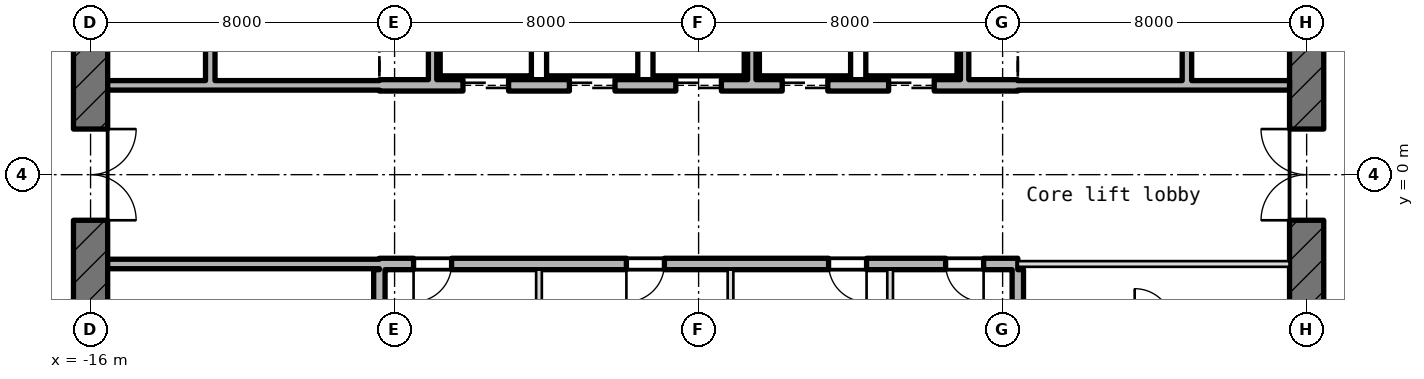
"""IFC4 building model, lengths in metres.
Left out: names, types, materials, properties, quantities, classifications, styles, units other than length and angle.
Written with IfcOpenShell. Run it as: python <this file> out.ifc"""

import sys

from ifc_helpers import new_model, si_unit, direction, frame, frame_2d, origin, place, context, subcontext, project, spatial, rectangle, extrude, element, fill, save


model = new_model("IFC4")
c1 = context("Model", 3, precision=1e-05, world=origin(), true_north=direction((0.0, 1.0)))
c2 = subcontext(c1, "Body", "Model", "MODEL_VIEW")
j1 = project(units=[si_unit("LENGTHUNIT", "METRE"), si_unit("PLANEANGLEUNIT", "RADIAN")], contexts=[c1])
p1 = place(None, origin())
s1 = spatial("IfcSite", under=j1, at=p1, CompositionType="ELEMENT")
p2 = place(p1, origin())
s2 = spatial("IfcBuilding", under=s1, at=p2, CompositionType="ELEMENT")
p3 = place(p2, frame((0.0, 0.0, 210.85)))
s3 = spatial("IfcBuildingStorey", under=s2, at=p3, CompositionType="ELEMENT", Elevation=210.85)
p4 = place(p3, frame((16.0, -10.186, -0.18), z_axis=(0.0, 0.0, 1.0), x_axis=(0.0, 1.0, 0.0)))
e1 = element("IfcWall", 1, at=p4, inside=s3, PredefinedType="SHEAR", context=c2, shape_type="SweptSolid", body=[
    extrude(rectangle(XDim=20.373, YDim=0.9, at=frame_2d((10.186, 0.0))), origin(), (0.0, 0.0, 1.0), 4.15),
])
p5 = place(p4, frame((8.986, 0.0, 0.18)))
e2 = element("IfcOpeningElement", 2, at=p5, cuts=e1, PredefinedType="OPENING", context=c2, shape_type="SweptSolid", body=[
    extrude(rectangle(XDim=2.4, YDim=2.1, at=frame_2d((1.2, 1.05))), frame((0.0, 0.46, 0.0), z_axis=(0.0, -1.0, 0.0), x_axis=(1.0, 0.0, 0.0)), (0.0, 0.0, 1.0), 0.92),
])
p6 = place(p4, frame((13.586, 0.0, 0.18)))
e3 = element("IfcOpeningElement", 3, at=p6, cuts=e1, PredefinedType="OPENING", context=c2, shape_type="SweptSolid", body=[
    extrude(rectangle(XDim=1.2, YDim=2.1, at=frame_2d((0.6, 1.05))), frame((0.0, 0.46, 0.0), z_axis=(0.0, -1.0, 0.0), x_axis=(1.0, 0.0, 0.0)), (0.0, 0.0, 1.0), 0.92),
])
p7 = place(p4, frame((4.786, 0.0, 0.18)))
e4 = element("IfcOpeningElement", 4, at=p7, cuts=e1, PredefinedType="OPENING", context=c2, shape_type="SweptSolid", body=[
    extrude(rectangle(XDim=1.2, YDim=2.1, at=frame_2d((0.6, 1.05))), frame((0.0, 0.46, 0.0), z_axis=(0.0, -1.0, 0.0), x_axis=(1.0, 0.0, 0.0)), (0.0, 0.0, 1.0), 0.92),
])
p8 = place(p3, frame((-16.0, 10.186, -0.18), z_axis=(0.0, 0.0, 1.0), x_axis=(0.0, -1.0, 0.0)))
e5 = element("IfcWall", 5, at=p8, inside=s3, PredefinedType="SHEAR", context=c2, shape_type="SweptSolid", body=[
    extrude(rectangle(XDim=20.373, YDim=0.9, at=frame_2d((10.186, 0.0))), origin(), (0.0, 0.0, 1.0), 4.15),
])
p9 = place(p8, frame((8.986, 0.0, 0.18)))
e6 = element("IfcOpeningElement", 6, at=p9, cuts=e5, PredefinedType="OPENING", context=c2, shape_type="SweptSolid", body=[
    extrude(rectangle(XDim=2.4, YDim=2.1, at=frame_2d((1.2, 1.05))), frame((0.0, 0.46, 0.0), z_axis=(0.0, -1.0, 0.0), x_axis=(1.0, 0.0, 0.0)), (0.0, 0.0, 1.0), 0.92),
])
p10 = place(p8, frame((5.586, 0.0, 0.18)))
e7 = element("IfcOpeningElement", 7, at=p10, cuts=e5, PredefinedType="OPENING", context=c2, shape_type="SweptSolid", body=[
    extrude(rectangle(XDim=1.2, YDim=2.1, at=frame_2d((0.6, 1.05))), frame((0.0, 0.46, 0.0), z_axis=(0.0, -1.0, 0.0), x_axis=(1.0, 0.0, 0.0)), (0.0, 0.0, 1.0), 0.92),
])
p11 = place(p3, frame((-15.55, -2.35, 0.0), z_axis=(0.0, 0.0, 1.0), x_axis=(1.0, 0.0, 0.0)))
e8 = element("IfcWall", 8, at=p11, inside=s3, PredefinedType="STANDARD", context=c2, shape_type="SweptSolid", body=[
    extrude(rectangle(XDim=7.15, YDim=0.25, at=frame_2d((3.575, 0.0))), origin(), (0.0, 0.0, 1.0), 3.97),
])
p12 = place(p3, frame((-8.4, -2.35, -0.18), z_axis=(0.0, 0.0, 1.0), x_axis=(1.0, 0.0, 0.0)))
e9 = element("IfcWall", 9, at=p12, inside=s3, PredefinedType="SHEAR", context=c2, shape_type="SweptSolid", body=[
    extrude(rectangle(XDim=16.8, YDim=0.3, at=frame_2d((8.4, 0.0))), origin(), (0.0, 0.0, 1.0), 4.15),
])
p13 = place(p12, frame((0.9, 0.0, 0.18)))
e10 = element("IfcOpeningElement", 10, at=p13, cuts=e9, PredefinedType="OPENING", context=c2, shape_type="SweptSolid", body=[
    extrude(rectangle(XDim=1.0, YDim=2.1, at=frame_2d((0.5, 1.05))), frame((0.0, 0.16, 0.0), z_axis=(0.0, -1.0, 0.0), x_axis=(1.0, 0.0, 0.0)), (0.0, 0.0, 1.0), 0.32),
])
p14 = place(p12, frame((6.5, 0.0, 0.18)))
e11 = element("IfcOpeningElement", 11, at=p14, cuts=e9, PredefinedType="OPENING", context=c2, shape_type="SweptSolid", body=[
    extrude(rectangle(XDim=1.0, YDim=2.1, at=frame_2d((0.5, 1.05))), frame((0.0, 0.16, 0.0), z_axis=(0.0, -1.0, 0.0), x_axis=(1.0, 0.0, 0.0)), (0.0, 0.0, 1.0), 0.32),
])
p15 = place(p12, frame((11.82, 0.0, 0.18)))
e12 = element("IfcOpeningElement", 12, at=p15, cuts=e9, PredefinedType="OPENING", context=c2, shape_type="SweptSolid", body=[
    extrude(rectangle(XDim=1.0, YDim=2.1, at=frame_2d((0.5, 1.05))), frame((0.0, 0.16, 0.0), z_axis=(0.0, -1.0, 0.0), x_axis=(1.0, 0.0, 0.0)), (0.0, 0.0, 1.0), 0.32),
])
p16 = place(p12, frame((14.9, 0.0, 0.18)))
e13 = element("IfcOpeningElement", 13, at=p16, cuts=e9, PredefinedType="OPENING", context=c2, shape_type="SweptSolid", body=[
    extrude(rectangle(XDim=1.0, YDim=2.1, at=frame_2d((0.5, 1.05))), frame((0.0, 0.16, 0.0), z_axis=(0.0, -1.0, 0.0), x_axis=(1.0, 0.0, 0.0)), (0.0, 0.0, 1.0), 0.32),
])
p17 = place(p3, frame((8.4, -2.35, 0.0), z_axis=(0.0, 0.0, 1.0), x_axis=(1.0, 0.0, 0.0)))
e14 = element("IfcWall", 14, at=p17, inside=s3, PredefinedType="PARTITIONING", context=c2, shape_type="SweptSolid", body=[
    extrude(rectangle(XDim=7.15, YDim=0.15, at=frame_2d((3.575, 0.0))), origin(), (0.0, 0.0, 1.0), 3.97),
])
p18 = place(p3, frame((-15.55, 2.35, 0.0), z_axis=(0.0, 0.0, 1.0), x_axis=(1.0, 0.0, 0.0)))
e15 = element("IfcWall", 15, at=p18, inside=s3, PredefinedType="STANDARD", context=c2, shape_type="SweptSolid", body=[
    extrude(rectangle(XDim=7.15, YDim=0.25, at=frame_2d((3.575, 0.0))), origin(), (0.0, 0.0, 1.0), 3.97),
])
p19 = place(p3, frame((-8.4, 2.35, -0.18), z_axis=(0.0, 0.0, 1.0), x_axis=(1.0, 0.0, 0.0)))
e16 = element("IfcWall", 16, at=p19, inside=s3, PredefinedType="SHEAR", context=c2, shape_type="SweptSolid", body=[
    extrude(rectangle(XDim=16.8, YDim=0.3, at=frame_2d((8.4, 0.0))), origin(), (0.0, 0.0, 1.0), 4.15),
])
p20 = place(p19, frame((2.2, 0.0, 0.18)))
e17 = element("IfcOpeningElement", 17, at=p20, cuts=e16, PredefinedType="OPENING", context=c2, shape_type="SweptSolid", body=[
    extrude(rectangle(XDim=1.2, YDim=2.1, at=frame_2d((0.6, 1.05))), frame((0.0, 0.16, 0.0), z_axis=(0.0, -1.0, 0.0), x_axis=(1.0, 0.0, 0.0)), (0.0, 0.0, 1.0), 0.32),
])
p21 = place(p19, frame((5.0, 0.0, 0.18)))
e18 = element("IfcOpeningElement", 18, at=p21, cuts=e16, PredefinedType="OPENING", context=c2, shape_type="SweptSolid", body=[
    extrude(rectangle(XDim=1.2, YDim=2.1, at=frame_2d((0.6, 1.05))), frame((0.0, 0.16, 0.0), z_axis=(0.0, -1.0, 0.0), x_axis=(1.0, 0.0, 0.0)), (0.0, 0.0, 1.0), 0.32),
])
p22 = place(p19, frame((7.8, 0.0, 0.18)))
e19 = element("IfcOpeningElement", 19, at=p22, cuts=e16, PredefinedType="OPENING", context=c2, shape_type="SweptSolid", body=[
    extrude(rectangle(XDim=1.2, YDim=2.1, at=frame_2d((0.6, 1.05))), frame((0.0, 0.16, 0.0), z_axis=(0.0, -1.0, 0.0), x_axis=(1.0, 0.0, 0.0)), (0.0, 0.0, 1.0), 0.32),
])
p23 = place(p19, frame((10.6, 0.0, 0.18)))
e20 = element("IfcOpeningElement", 20, at=p23, cuts=e16, PredefinedType="OPENING", context=c2, shape_type="SweptSolid", body=[
    extrude(rectangle(XDim=1.2, YDim=2.1, at=frame_2d((0.6, 1.05))), frame((0.0, 0.16, 0.0), z_axis=(0.0, -1.0, 0.0), x_axis=(1.0, 0.0, 0.0)), (0.0, 0.0, 1.0), 0.32),
])
p24 = place(p19, frame((13.4, 0.0, 0.18)))
e21 = element("IfcOpeningElement", 21, at=p24, cuts=e16, PredefinedType="OPENING", context=c2, shape_type="SweptSolid", body=[
    extrude(rectangle(XDim=1.2, YDim=2.1, at=frame_2d((0.6, 1.05))), frame((0.0, 0.16, 0.0), z_axis=(0.0, -1.0, 0.0), x_axis=(1.0, 0.0, 0.0)), (0.0, 0.0, 1.0), 0.32),
])
p25 = place(p3, frame((8.4, 2.35, 0.0), z_axis=(0.0, 0.0, 1.0), x_axis=(1.0, 0.0, 0.0)))
e22 = element("IfcWall", 22, at=p25, inside=s3, PredefinedType="STANDARD", context=c2, shape_type="SweptSolid", body=[
    extrude(rectangle(XDim=7.15, YDim=0.25, at=frame_2d((3.575, 0.0))), origin(), (0.0, 0.0, 1.0), 3.97),
])
p26 = place(p3, frame((-12.85, 2.475, 0.0), z_axis=(0.0, 0.0, 1.0), x_axis=(0.0, 1.0, 0.0)))
e23 = element("IfcWall", 23, at=p26, inside=s3, PredefinedType="STANDARD", context=c2, shape_type="SweptSolid", body=[
    extrude(rectangle(XDim=3.05, YDim=0.25, at=frame_2d((1.525, 0.0))), origin(), (0.0, 0.0, 1.0), 3.97),
])
p27 = place(p3, frame((-8.4, -8.75, -0.18), z_axis=(0.0, 0.0, 1.0), x_axis=(0.0, 1.0, 0.0)))
e24 = element("IfcWall", 24, at=p27, inside=s3, PredefinedType="SHEAR", context=c2, shape_type="SweptSolid", body=[
    extrude(rectangle(XDim=6.25, YDim=0.3, at=frame_2d((3.125, 0.0))), origin(), (0.0, 0.0, 1.0), 4.15),
])
p28 = place(p3, frame((-7.0, 2.5, 0.0), z_axis=(0.0, 0.0, 1.0), x_axis=(0.0, 1.0, 0.0)))
e25 = element("IfcWall", 25, at=p28, inside=s3, PredefinedType="STANDARD", context=c2, shape_type="SweptSolid", body=[
    extrude(rectangle(XDim=2.74, YDim=0.22, at=frame_2d((1.37, 0.0))), origin(), (0.0, 0.0, 1.0), 3.97),
])
for number, where, z_axis, x_axis in (
    (26, (-4.2, -5.24, 0.0), (0.0, 0.0, 1.0), (0.0, 1.0, 0.0)),
    (27, (0.84, -5.24, 0.0), (0.0, 0.0, 1.0), (0.0, 1.0, 0.0)),
):
    element("IfcWall", number, at=place(p3, frame(where, z_axis=z_axis, x_axis=x_axis)), inside=s3, PredefinedType="PARTITIONING", context=c2, shape_type="SweptSolid", body=[
        extrude(rectangle(XDim=2.74, YDim=0.15, at=frame_2d((1.37, 0.0))), origin(), (0.0, 0.0, 1.0), 3.97),
    ])
p29 = place(p3, frame((1.4, 2.5, 0.0), z_axis=(0.0, 0.0, 1.0), x_axis=(0.0, 1.0, 0.0)))
e28 = element("IfcWall", 28, at=p29, inside=s3, PredefinedType="STANDARD", context=c2, shape_type="SweptSolid", body=[
    extrude(rectangle(XDim=2.74, YDim=0.22, at=frame_2d((1.37, 0.0))), origin(), (0.0, 0.0, 1.0), 3.97),
])
p30 = place(p3, frame((5.04, -5.24, 0.0), z_axis=(0.0, 0.0, 1.0), x_axis=(0.0, 1.0, 0.0)))
e29 = element("IfcWall", 29, at=p30, inside=s3, PredefinedType="PARTITIONING", context=c2, shape_type="SweptSolid", body=[
    extrude(rectangle(XDim=2.74, YDim=0.15, at=frame_2d((1.37, 0.0))), origin(), (0.0, 0.0, 1.0), 3.97),
])
p31 = place(p3, frame((7.0, 2.5, 0.0), z_axis=(0.0, 0.0, 1.0), x_axis=(0.0, 1.0, 0.0)))
e30 = element("IfcWall", 30, at=p31, inside=s3, PredefinedType="STANDARD", context=c2, shape_type="SweptSolid", body=[
    extrude(rectangle(XDim=2.74, YDim=0.22, at=frame_2d((1.37, 0.0))), origin(), (0.0, 0.0, 1.0), 3.97),
])
p32 = place(p3, frame((8.4, -8.35, -0.18), z_axis=(0.0, 0.0, 1.0), x_axis=(0.0, 1.0, 0.0)))
e31 = element("IfcWall", 31, at=p32, inside=s3, PredefinedType="SHEAR", context=c2, shape_type="SweptSolid", body=[
    extrude(rectangle(XDim=5.85, YDim=0.3, at=frame_2d((2.925, 0.0))), origin(), (0.0, 0.0, 1.0), 4.15),
])
p33 = place(p3, frame((12.85, 2.475, 0.0), z_axis=(0.0, 0.0, 1.0), x_axis=(0.0, 1.0, 0.0)))
e32 = element("IfcWall", 32, at=p33, inside=s3, PredefinedType="STANDARD", context=c2, shape_type="SweptSolid", body=[
    extrude(rectangle(XDim=3.05, YDim=0.25, at=frame_2d((1.525, 0.0))), origin(), (0.0, 0.0, 1.0), 3.97),
])
p34 = place(p20, origin())
e33 = element("IfcDoor", 33, at=p34, inside=s3, OperationType="DOUBLE_DOOR_SLIDING", PredefinedType="DOOR", context=c2, shape_type="SweptSolid", body=[
    extrude(rectangle(XDim=1.2, YDim=2.1, at=frame_2d((0.6, 1.05))), frame((0.0, 0.025, 0.0), z_axis=(0.0, -1.0, 0.0), x_axis=(1.0, 0.0, 0.0)), (0.0, 0.0, 1.0), 0.05),
])
fill(e17, e33)
p35 = place(p21, origin())
e34 = element("IfcDoor", 34, at=p35, inside=s3, OperationType="DOUBLE_DOOR_SLIDING", PredefinedType="DOOR", context=c2, shape_type="SweptSolid", body=[
    extrude(rectangle(XDim=1.2, YDim=2.1, at=frame_2d((0.6, 1.05))), frame((0.0, 0.025, 0.0), z_axis=(0.0, -1.0, 0.0), x_axis=(1.0, 0.0, 0.0)), (0.0, 0.0, 1.0), 0.05),
])
fill(e18, e34)
p36 = place(p22, origin())
e35 = element("IfcDoor", 35, at=p36, inside=s3, OperationType="DOUBLE_DOOR_SLIDING", PredefinedType="DOOR", context=c2, shape_type="SweptSolid", body=[
    extrude(rectangle(XDim=1.2, YDim=2.1, at=frame_2d((0.6, 1.05))), frame((0.0, 0.025, 0.0), z_axis=(0.0, -1.0, 0.0), x_axis=(1.0, 0.0, 0.0)), (0.0, 0.0, 1.0), 0.05),
])
fill(e19, e35)
p37 = place(p23, origin())
e36 = element("IfcDoor", 36, at=p37, inside=s3, OperationType="DOUBLE_DOOR_SLIDING", PredefinedType="DOOR", context=c2, shape_type="SweptSolid", body=[
    extrude(rectangle(XDim=1.2, YDim=2.1, at=frame_2d((0.6, 1.05))), frame((0.0, 0.025, 0.0), z_axis=(0.0, -1.0, 0.0), x_axis=(1.0, 0.0, 0.0)), (0.0, 0.0, 1.0), 0.05),
])
fill(e20, e36)
p38 = place(p24, origin())
e37 = element("IfcDoor", 37, at=p38, inside=s3, OperationType="DOUBLE_DOOR_SLIDING", PredefinedType="DOOR", context=c2, shape_type="SweptSolid", body=[
    extrude(rectangle(XDim=1.2, YDim=2.1, at=frame_2d((0.6, 1.05))), frame((0.0, 0.025, 0.0), z_axis=(0.0, -1.0, 0.0), x_axis=(1.0, 0.0, 0.0)), (0.0, 0.0, 1.0), 0.05),
])
fill(e21, e37)
p39 = place(p9, origin())
e38 = element("IfcDoor", 38, at=p39, inside=s3, OperationType="DOUBLE_DOOR_SINGLE_SWING", PredefinedType="DOOR", context=c2, shape_type="SweptSolid", body=[
    extrude(rectangle(XDim=2.4, YDim=2.1, at=frame_2d((1.2, 1.05))), frame((0.0, 0.025, 0.0), z_axis=(0.0, -1.0, 0.0), x_axis=(1.0, 0.0, 0.0)), (0.0, 0.0, 1.0), 0.05),
])
fill(e6, e38)
p40 = place(p5, origin())
e39 = element("IfcDoor", 39, at=p40, inside=s3, OperationType="DOUBLE_DOOR_SINGLE_SWING", PredefinedType="DOOR", context=c2, shape_type="SweptSolid", body=[
    extrude(rectangle(XDim=2.4, YDim=2.1, at=frame_2d((1.2, 1.05))), frame((0.0, 0.025, 0.0), z_axis=(0.0, -1.0, 0.0), x_axis=(1.0, 0.0, 0.0)), (0.0, 0.0, 1.0), 0.05),
])
fill(e2, e39)
p41 = place(p13, frame((1.0, 0.0, 0.0), z_axis=(0.0, 0.0, 1.0), x_axis=(-1.0, 0.0, 0.0)))
e40 = element("IfcDoor", 40, at=p41, inside=s3, OperationType="SINGLE_SWING_LEFT", PredefinedType="DOOR", context=c2, shape_type="SweptSolid", body=[
    extrude(rectangle(XDim=1.0, YDim=2.1, at=frame_2d((0.5, 1.05))), frame((0.0, 0.025, 0.0), z_axis=(0.0, -1.0, 0.0), x_axis=(1.0, 0.0, 0.0)), (0.0, 0.0, 1.0), 0.05),
])
fill(e10, e40)
p42 = place(p14, frame((1.0, 0.0, 0.0), z_axis=(0.0, 0.0, 1.0), x_axis=(-1.0, 0.0, 0.0)))
e41 = element("IfcDoor", 41, at=p42, inside=s3, OperationType="SINGLE_SWING_LEFT", PredefinedType="DOOR", context=c2, shape_type="SweptSolid", body=[
    extrude(rectangle(XDim=1.0, YDim=2.1, at=frame_2d((0.5, 1.05))), frame((0.0, 0.025, 0.0), z_axis=(0.0, -1.0, 0.0), x_axis=(1.0, 0.0, 0.0)), (0.0, 0.0, 1.0), 0.05),
])
fill(e11, e41)
p43 = place(p15, frame((1.0, 0.0, 0.0), z_axis=(0.0, 0.0, 1.0), x_axis=(-1.0, 0.0, 0.0)))
e42 = element("IfcDoor", 42, at=p43, inside=s3, OperationType="SINGLE_SWING_LEFT", PredefinedType="DOOR", context=c2, shape_type="SweptSolid", body=[
    extrude(rectangle(XDim=1.0, YDim=2.1, at=frame_2d((0.5, 1.05))), frame((0.0, 0.025, 0.0), z_axis=(0.0, -1.0, 0.0), x_axis=(1.0, 0.0, 0.0)), (0.0, 0.0, 1.0), 0.05),
])
fill(e12, e42)
p44 = place(p16, frame((1.0, 0.0, 0.0), z_axis=(0.0, 0.0, 1.0), x_axis=(-1.0, 0.0, 0.0)))
e43 = element("IfcDoor", 43, at=p44, inside=s3, OperationType="SINGLE_SWING_LEFT", PredefinedType="DOOR", context=c2, shape_type="SweptSolid", body=[
    extrude(rectangle(XDim=1.0, YDim=2.1, at=frame_2d((0.5, 1.05))), frame((0.0, 0.025, 0.0), z_axis=(0.0, -1.0, 0.0), x_axis=(1.0, 0.0, 0.0)), (0.0, 0.0, 1.0), 0.05),
])
fill(e13, e43)
save(model, sys.argv[1])
